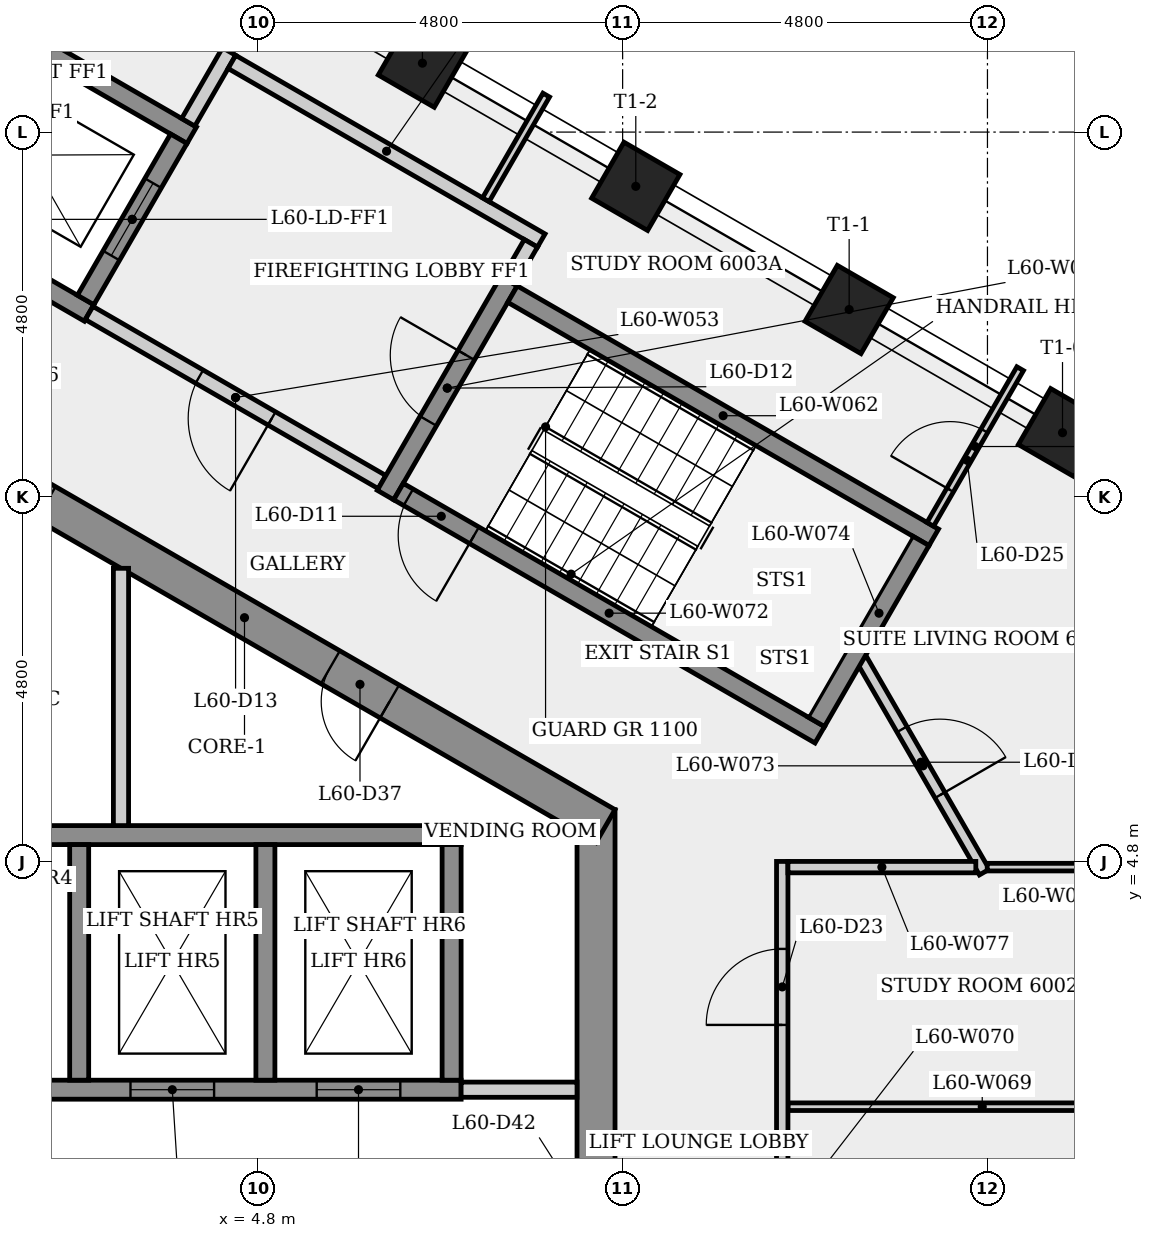
"""IFC4 building model, lengths in metres.
Left out: names, types, materials, properties, quantities, classifications, styles, units other than length and angle.
Written with IfcOpenShell. Run it as: python <this file> out.ifc"""

import sys

from ifc_helpers import new_model, si_unit, direction, frame, frame_2d, origin, origin_2d, place, context, subcontext, project, spatial, rectangle, extrude, element, fill, save


model = new_model("IFC4")
c1 = context("Model", 3, precision=1e-05, world=origin(), true_north=direction((0.0, 1.0)))
c2 = subcontext(c1, "Body", "Model", "MODEL_VIEW")
j1 = project(units=[si_unit("LENGTHUNIT", "METRE"), si_unit("PLANEANGLEUNIT", "RADIAN")], contexts=[c1])
p1 = place(None, origin())
s1 = spatial("IfcSite", under=j1, at=p1, CompositionType="ELEMENT")
p2 = place(p1, origin())
s2 = spatial("IfcBuilding", under=s1, at=p2, CompositionType="ELEMENT")
p3 = place(p2, frame((0.0, 0.0, 225.7)))
s3 = spatial("IfcBuildingStorey", under=s2, at=p3, CompositionType="ELEMENT", Elevation=225.7)
p4 = place(p3, frame((9.25, -5.485, 0.0), z_axis=(0.0, 0.0, 1.0), x_axis=(0.0, 1.0, 0.0)))
e1 = element("IfcWall", 1, at=p4, inside=s3, PredefinedType="SHEAR", context=c2, shape_type="SweptSolid", body=[
    extrude(rectangle(XDim=10.97, YDim=0.5, at=frame_2d((5.485, 0.0))), origin(), (0.0, 0.0, 1.0), 3.4),
])
p5 = place(p4, frame((4.685, 0.0, 0.0)))
e2 = element("IfcOpeningElement", 2, at=p5, cuts=e1, PredefinedType="OPENING", context=c2, shape_type="SweptSolid", body=[
    extrude(rectangle(XDim=1.6, YDim=2.1, at=frame_2d((0.8, 1.05))), frame((0.0, 0.26, 0.0), z_axis=(0.0, -1.0, 0.0), x_axis=(1.0, 0.0, 0.0)), (0.0, 0.0, 1.0), 0.52),
])
p6 = place(p3, frame((9.375, 5.268, 0.0), z_axis=(0.0, 0.0, 1.0), x_axis=(-0.866023993627, 0.500002442456, 0.0)))
e3 = element("IfcWall", 3, at=p6, inside=s3, PredefinedType="SHEAR", context=c2, shape_type="SweptSolid", body=[
    extrude(rectangle(XDim=10.97, YDim=0.5, at=frame_2d((5.485, 0.0))), origin(), (0.0, 0.0, 1.0), 3.4),
])
p7 = place(p6, frame((8.5, 0.0, 0.0)))
e4 = element("IfcOpeningElement", 4, at=p7, cuts=e3, PredefinedType="OPENING", context=c2, shape_type="SweptSolid", body=[
    extrude(rectangle(XDim=0.9, YDim=2.1, at=frame_2d((0.45, 1.05))), frame((0.0, 0.26, 0.0), z_axis=(0.0, -1.0, 0.0), x_axis=(1.0, 0.0, 0.0)), (0.0, 0.0, 1.0), 0.52),
])
p8 = place(p6, frame((3.28, 0.0, 0.0)))
e5 = element("IfcOpeningElement", 5, at=p8, cuts=e3, PredefinedType="OPENING", context=c2, shape_type="SweptSolid", body=[
    extrude(rectangle(XDim=0.9, YDim=2.1, at=frame_2d((0.45, 1.05))), frame((0.0, 0.26, 0.0), z_axis=(0.0, -1.0, 0.0), x_axis=(1.0, 0.0, 0.0)), (0.0, 0.0, 1.0), 0.52),
])
for number, where, z_axis, x_axis in (
    (6, (15.387, 10.445, 0.0), (0.0, 0.0, 1.0), (0.5, 0.866, 0.0)),
    (7, (12.58, 12.065, 0.0), (0.0, 0.0, 1.0), (0.5, 0.866, 0.0)),
    (8, (9.773, 13.686, 0.0), (0.0, 0.0, 1.0), (0.5, 0.866, 0.0)),
    (9, (6.966, 15.307, 0.0), (0.0, 0.0, 1.0), (0.5, 0.866, 0.0)),
):
    element("IfcColumn", number, at=place(p3, frame(where, z_axis=z_axis, x_axis=x_axis)), inside=s3, PredefinedType="COLUMN", context=c2, shape_type="SweptSolid", body=[
        extrude(rectangle(XDim=0.85, YDim=0.85, at=origin_2d()), origin(), (0.0, 0.0, 1.0), 3.4),
    ])
p9 = place(p3, frame((-7.475, 1.8, 0.0), z_axis=(0.0, 0.0, 1.0), x_axis=(1.0, 0.0, 0.0)))
e10 = element("IfcWall", 10, at=p9, inside=s3, PredefinedType="SHEAR", context=c2, shape_type="SweptSolid", body=[
    extrude(rectangle(XDim=14.95, YDim=0.25, at=frame_2d((7.475, 0.0))), origin(), (0.0, 0.0, 1.0), 3.05),
])
p10 = place(p9, frame((0.8, 0.0, 0.0)))
e11 = element("IfcOpeningElement", 11, at=p10, cuts=e10, PredefinedType="OPENING", context=c2, shape_type="SweptSolid", body=[
    extrude(rectangle(XDim=1.1, YDim=2.1, at=frame_2d((0.55, 1.05))), frame((0.0, 0.135, 0.0), z_axis=(0.0, -1.0, 0.0), x_axis=(1.0, 0.0, 0.0)), (0.0, 0.0, 1.0), 0.27),
])
p11 = place(p9, frame((3.25, 0.0, 0.0)))
e12 = element("IfcOpeningElement", 12, at=p11, cuts=e10, PredefinedType="OPENING", context=c2, shape_type="SweptSolid", body=[
    extrude(rectangle(XDim=1.1, YDim=2.1, at=frame_2d((0.55, 1.05))), frame((0.0, 0.135, 0.0), z_axis=(0.0, -1.0, 0.0), x_axis=(1.0, 0.0, 0.0)), (0.0, 0.0, 1.0), 0.27),
])
p12 = place(p9, frame((5.7, 0.0, 0.0)))
e13 = element("IfcOpeningElement", 13, at=p12, cuts=e10, PredefinedType="OPENING", context=c2, shape_type="SweptSolid", body=[
    extrude(rectangle(XDim=1.1, YDim=2.1, at=frame_2d((0.55, 1.05))), frame((0.0, 0.135, 0.0), z_axis=(0.0, -1.0, 0.0), x_axis=(1.0, 0.0, 0.0)), (0.0, 0.0, 1.0), 0.27),
])
p13 = place(p9, frame((8.15, 0.0, 0.0)))
e14 = element("IfcOpeningElement", 14, at=p13, cuts=e10, PredefinedType="OPENING", context=c2, shape_type="SweptSolid", body=[
    extrude(rectangle(XDim=1.1, YDim=2.1, at=frame_2d((0.55, 1.05))), frame((0.0, 0.135, 0.0), z_axis=(0.0, -1.0, 0.0), x_axis=(1.0, 0.0, 0.0)), (0.0, 0.0, 1.0), 0.27),
])
p14 = place(p9, frame((10.6, 0.0, 0.0)))
e15 = element("IfcOpeningElement", 15, at=p14, cuts=e10, PredefinedType="OPENING", context=c2, shape_type="SweptSolid", body=[
    extrude(rectangle(XDim=1.1, YDim=2.1, at=frame_2d((0.55, 1.05))), frame((0.0, 0.135, 0.0), z_axis=(0.0, -1.0, 0.0), x_axis=(1.0, 0.0, 0.0)), (0.0, 0.0, 1.0), 0.27),
])
p15 = place(p9, frame((13.05, 0.0, 0.0)))
e16 = element("IfcOpeningElement", 16, at=p15, cuts=e10, PredefinedType="OPENING", context=c2, shape_type="SweptSolid", body=[
    extrude(rectangle(XDim=1.1, YDim=2.1, at=frame_2d((0.55, 1.05))), frame((0.0, 0.135, 0.0), z_axis=(0.0, -1.0, 0.0), x_axis=(1.0, 0.0, 0.0)), (0.0, 0.0, 1.0), 0.27),
])
p16 = place(p3, frame((-7.225, 5.15, 0.0), z_axis=(0.0, 0.0, 1.0), x_axis=(1.0, 0.0, 0.0)))
e17 = element("IfcWall", 17, at=p16, inside=s3, PredefinedType="SHEAR", context=c2, shape_type="SweptSolid", body=[
    extrude(rectangle(XDim=14.7, YDim=0.25, at=frame_2d((7.35, 0.0))), origin(), (0.0, 0.0, 1.0), 3.05),
])
p17 = place(p3, frame((1.073, 16.008, 0.0), z_axis=(0.0, 0.0, 1.0), x_axis=(0.866040211805, -0.499974350878, 0.0)))
e18 = element("IfcWall", 18, at=p17, inside=s3, PredefinedType="SHEAR", context=c2, shape_type="SweptSolid", body=[
    extrude(rectangle(XDim=3.3, YDim=0.25, at=frame_2d((1.65, 0.0))), origin(), (0.0, 0.0, 1.0), 3.05),
])
p18 = place(p3, frame((2.45, 5.025, 0.0), z_axis=(0.0, 0.0, 1.0), x_axis=(0.0, -1.0, 0.0)))
e19 = element("IfcWall", 19, at=p18, inside=s3, PredefinedType="SHEAR", context=c2, shape_type="SweptSolid", body=[
    extrude(rectangle(XDim=3.1, YDim=0.25, at=frame_2d((1.55, 0.0))), origin(), (0.0, 0.0, 1.0), 3.4),
])
p19 = place(p3, frame((2.581, 12.02, 0.0), z_axis=(0.0, 0.0, 1.0), x_axis=(-0.866040211805, 0.499974350878, 0.0)))
e20 = element("IfcWall", 20, at=p19, inside=s3, PredefinedType="SHEAR", context=c2, shape_type="SweptSolid", body=[
    extrude(rectangle(XDim=3.3, YDim=0.25, at=frame_2d((1.65, 0.0))), origin(), (0.0, 0.0, 1.0), 3.05),
])
p20 = place(p3, frame((2.535, 12.191, 0.0), z_axis=(0.0, 0.0, 1.0), x_axis=(0.500061746146, 0.865989751695, 0.0)))
e21 = element("IfcWall", 21, at=p20, inside=s3, PredefinedType="SHEAR", context=c2, shape_type="SweptSolid", body=[
    extrude(rectangle(XDim=2.45, YDim=0.25, at=frame_2d((1.225, 0.0))), origin(), (0.0, 0.0, 1.0), 3.4),
])
p21 = place(p20, frame((0.675, 0.0, 0.0)))
e22 = element("IfcOpeningElement", 22, at=p21, cuts=e21, PredefinedType="OPENING", context=c2, shape_type="SweptSolid", body=[
    extrude(rectangle(XDim=1.1, YDim=2.1, at=frame_2d((0.55, 1.05))), frame((0.0, 0.135, 0.0), z_axis=(0.0, -1.0, 0.0), x_axis=(1.0, 0.0, 0.0)), (0.0, 0.0, 1.0), 0.27),
])
p22 = place(p3, frame((3.0, 8.66, 0.0), z_axis=(0.0, 0.0, 1.0), x_axis=(0.0, -1.0, 0.0)))
e23 = element("IfcWall", 23, at=p22, inside=s3, PredefinedType="PARTITIONING", context=c2, shape_type="SweptSolid", body=[
    extrude(rectangle(XDim=3.385, YDim=0.2, at=frame_2d((1.693, 0.0))), origin(), (0.0, 0.0, 1.0), 3.05),
])
p23 = place(p3, frame((3.885, 14.529, 0.0), z_axis=(0.0, 0.0, 1.0), x_axis=(0.499997628298, 0.866026773083, 0.0)))
e24 = element("IfcWall", 24, at=p23, inside=s3, PredefinedType="PARTITIONING", context=c2, shape_type="SweptSolid", body=[
    extrude(rectangle(XDim=1.075, YDim=0.2, at=frame_2d((0.538, 0.0))), origin(), (0.0, 0.0, 1.0), 3.05),
])
p24 = place(p3, frame((4.459, 15.323, 0.0), z_axis=(0.0, 0.0, 1.0), x_axis=(0.866016039709, -0.500016218704, 0.0)))
e25 = element("IfcWall", 25, at=p24, inside=s3, PredefinedType="PARTITIONING", context=c2, shape_type="SweptSolid", body=[
    extrude(rectangle(XDim=4.7, YDim=0.2, at=frame_2d((2.35, 0.0))), origin(), (0.0, 0.0, 1.0), 3.05),
])
p25 = place(p3, frame((4.9, 5.025, 0.0), z_axis=(0.0, 0.0, 1.0), x_axis=(0.0, -1.0, 0.0)))
e26 = element("IfcWall", 26, at=p25, inside=s3, PredefinedType="SHEAR", context=c2, shape_type="SweptSolid", body=[
    extrude(rectangle(XDim=3.1, YDim=0.25, at=frame_2d((1.55, 0.0))), origin(), (0.0, 0.0, 1.0), 3.4),
])
p26 = place(p3, frame((6.435, 9.795, 0.0), z_axis=(0.0, 0.0, 1.0), x_axis=(-0.866012907634, 0.500021643343, 0.0)))
e27 = element("IfcWall", 27, at=p26, inside=s3, PredefinedType="PARTITIONING", context=c2, shape_type="SweptSolid", body=[
    extrude(rectangle(XDim=4.45, YDim=0.2, at=frame_2d((2.225, 0.0))), origin(), (0.0, 0.0, 1.0), 3.05),
])
p27 = place(p26, frame((1.675, 0.0, 0.0)))
e28 = element("IfcOpeningElement", 28, at=p27, cuts=e27, PredefinedType="OPENING", context=c2, shape_type="SweptSolid", body=[
    extrude(rectangle(XDim=1.1, YDim=2.1, at=frame_2d((0.55, 1.05))), frame((0.0, 0.11, 0.0), z_axis=(0.0, -1.0, 0.0), x_axis=(1.0, 0.0, 0.0)), (0.0, 0.0, 1.0), 0.22),
])
p28 = place(p3, frame((6.48, 9.624, 0.0), z_axis=(0.0, 0.0, 1.0), x_axis=(0.500017246033, 0.866015446554, 0.0)))
e29 = element("IfcWall", 29, at=p28, inside=s3, PredefinedType="SHEAR", context=c2, shape_type="SweptSolid", body=[
    extrude(rectangle(XDim=3.25, YDim=0.25, at=frame_2d((1.625, 0.0))), origin(), (0.0, 0.0, 1.0), 3.05),
])
p29 = place(p28, frame((1.125, 0.0, 0.0)))
e30 = element("IfcOpeningElement", 30, at=p29, cuts=e29, PredefinedType="OPENING", context=c2, shape_type="SweptSolid", body=[
    extrude(rectangle(XDim=1.0, YDim=2.1, at=frame_2d((0.5, 1.05))), frame((0.0, 0.135, 0.0), z_axis=(0.0, -1.0, 0.0), x_axis=(1.0, 0.0, 0.0)), (0.0, 0.0, 1.0), 0.27),
])
p30 = place(p3, frame((7.475, 1.8, 0.0), z_axis=(0.0, 0.0, 1.0), x_axis=(1.0, 0.0, 0.0)))
e31 = element("IfcWall", 31, at=p30, inside=s3, PredefinedType="PARTITIONING", context=c2, shape_type="SweptSolid", body=[
    extrude(rectangle(XDim=1.525, YDim=0.2, at=frame_2d((0.763, 0.0))), origin(), (0.0, 0.0, 1.0), 3.05),
])
p31 = place(p3, frame((7.35, 5.025, 0.0), z_axis=(0.0, 0.0, 1.0), x_axis=(0.0, -1.0, 0.0)))
e32 = element("IfcWall", 32, at=p31, inside=s3, PredefinedType="SHEAR", context=c2, shape_type="SweptSolid", body=[
    extrude(rectangle(XDim=3.1, YDim=0.25, at=frame_2d((1.55, 0.0))), origin(), (0.0, 0.0, 1.0), 3.4),
])
p32 = place(p3, frame((7.8, 13.51, 0.0), z_axis=(0.0, 0.0, 1.0), x_axis=(0.500037068326, 0.866004001318, 0.0)))
e33 = element("IfcWall", 33, at=p32, inside=s3, PredefinedType="PARTITIONING", context=c2, shape_type="SweptSolid", body=[
    extrude(rectangle(XDim=1.59, YDim=0.1, at=frame_2d((0.795, 0.0))), origin(), (0.0, 0.0, 1.0), 3.05),
])
p33 = place(p3, frame((8.151, 12.268, 0.0), z_axis=(0.0, 0.0, 1.0), x_axis=(0.866025499775, -0.499999833739, 0.0)))
e34 = element("IfcWall", 34, at=p33, inside=s3, PredefinedType="SHEAR", context=c2, shape_type="SweptSolid", body=[
    extrude(rectangle(XDim=6.4, YDim=0.25, at=frame_2d((3.2, 0.0))), origin(), (0.0, 0.0, 1.0), 3.05),
])
p34 = place(p3, frame((8.393, 12.937, 0.0), z_axis=(0.0, 0.0, 1.0), x_axis=(-0.500065409566, -0.86598763626, 0.0)))
e35 = element("IfcWall", 35, at=p34, inside=s3, PredefinedType="PARTITIONING", context=c2, shape_type="SweptSolid", body=[
    extrude(rectangle(XDim=0.575, YDim=0.2, at=frame_2d((0.288, 0.0))), origin(), (0.0, 0.0, 1.0), 3.05),
])
p35 = place(p3, frame((11.775, 1.576, 0.0), z_axis=(0.0, 0.0, 1.0), x_axis=(1.0, 0.0, 0.0)))
e36 = element("IfcWall", 36, at=p35, inside=s3, PredefinedType="PARTITIONING", context=c2, shape_type="SweptSolid", body=[
    extrude(rectangle(XDim=5.113, YDim=0.1, at=frame_2d((2.556, 0.0))), origin(), (0.0, 0.0, 1.0), 3.05),
])
p36 = place(p3, frame((11.7, -4.654, 0.0), z_axis=(0.0, 0.0, 1.0), x_axis=(0.0, 1.0, 0.0)))
e37 = element("IfcWall", 37, at=p36, inside=s3, PredefinedType="PARTITIONING", context=c2, shape_type="SweptSolid", body=[
    extrude(rectangle(XDim=9.457, YDim=0.15, at=frame_2d((4.729, 0.0))), origin(), (0.0, 0.0, 1.0), 3.05),
])
p37 = place(p36, frame((2.6, 0.0, 0.0)))
e38 = element("IfcOpeningElement", 38, at=p37, cuts=e37, PredefinedType="OPENING", context=c2, shape_type="SweptSolid", body=[
    extrude(rectangle(XDim=1.0, YDim=2.1, at=frame_2d((0.5, 1.05))), frame((0.0, 0.085, 0.0), z_axis=(0.0, -1.0, 0.0), x_axis=(1.0, 0.0, 0.0)), (0.0, 0.0, 1.0), 0.17),
])
p38 = place(p36, frame((7.306, 0.0, 0.0)))
e39 = element("IfcOpeningElement", 39, at=p38, cuts=e37, PredefinedType="OPENING", context=c2, shape_type="SweptSolid", body=[
    extrude(rectangle(XDim=1.0, YDim=2.1, at=frame_2d((0.5, 1.05))), frame((0.0, 0.085, 0.0), z_axis=(0.0, -1.0, 0.0), x_axis=(1.0, 0.0, 0.0)), (0.0, 0.0, 1.0), 0.17),
])
p39 = place(p3, frame((12.194, 6.47, 0.0), z_axis=(0.0, 0.0, 1.0), x_axis=(-0.866025499775, 0.499999833739, 0.0)))
e40 = element("IfcWall", 40, at=p39, inside=s3, PredefinedType="SHEAR", context=c2, shape_type="SweptSolid", body=[
    extrude(rectangle(XDim=6.4, YDim=0.25, at=frame_2d((3.2, 0.0))), origin(), (0.0, 0.0, 1.0), 3.05),
])
p40 = place(p39, frame((5.25, 0.0, 0.0)))
e41 = element("IfcOpeningElement", 41, at=p40, cuts=e40, PredefinedType="OPENING", context=c2, shape_type="SweptSolid", body=[
    extrude(rectangle(XDim=1.0, YDim=2.1, at=frame_2d((0.5, 1.05))), frame((0.0, 0.135, 0.0), z_axis=(0.0, -1.0, 0.0), x_axis=(1.0, 0.0, 0.0)), (0.0, 0.0, 1.0), 0.27),
])
p41 = place(p3, frame((12.745, 7.459, 0.0), z_axis=(0.0, 0.0, 1.0), x_axis=(0.500019253631, -0.86601428741, 0.0)))
e42 = element("IfcWall", 42, at=p41, inside=s3, PredefinedType="PARTITIONING", context=c2, shape_type="SweptSolid", body=[
    extrude(rectangle(XDim=3.228, YDim=0.15, at=frame_2d((1.614, 0.0))), origin(), (0.0, 0.0, 1.0), 3.05),
])
p42 = place(p41, frame((1.059, 0.0, 0.0)))
e43 = element("IfcOpeningElement", 43, at=p42, cuts=e42, PredefinedType="OPENING", context=c2, shape_type="SweptSolid", body=[
    extrude(rectangle(XDim=1.0, YDim=2.1, at=frame_2d((0.5, 1.05))), frame((0.0, 0.085, 0.0), z_axis=(0.0, -1.0, 0.0), x_axis=(1.0, 0.0, 0.0)), (0.0, 0.0, 1.0), 0.17),
])
p43 = place(p3, frame((12.148, 6.641, 0.0), z_axis=(0.0, 0.0, 1.0), x_axis=(0.500034990121, 0.866005201286, 0.0)))
e44 = element("IfcWall", 44, at=p43, inside=s3, PredefinedType="SHEAR", context=c2, shape_type="SweptSolid", body=[
    extrude(rectangle(XDim=2.75, YDim=0.25, at=frame_2d((1.375, 0.0))), origin(), (0.0, 0.0, 1.0), 3.05),
])
p44 = place(p3, frame((13.648, 9.239, 0.0), z_axis=(0.0, 0.0, 1.0), x_axis=(0.50004711805, 0.865998198456, 0.0)))
e45 = element("IfcWall", 45, at=p44, inside=s3, PredefinedType="PARTITIONING", context=c2, shape_type="SweptSolid", body=[
    extrude(rectangle(XDim=2.365, YDim=0.1, at=frame_2d((1.183, 0.0))), origin(), (0.0, 0.0, 1.0), 3.05),
])
p45 = place(p44, frame((0.522, 0.0, 0.0)))
e46 = element("IfcOpeningElement", 46, at=p45, cuts=e45, PredefinedType="OPENING", context=c2, shape_type="SweptSolid", body=[
    extrude(rectangle(XDim=0.9, YDim=2.1, at=frame_2d((0.45, 1.05))), frame((0.0, 0.06, 0.0), z_axis=(0.0, -1.0, 0.0), x_axis=(1.0, 0.0, 0.0)), (0.0, 0.0, 1.0), 0.12),
])
p46 = place(p3, frame((14.247, 4.729, 0.0), z_axis=(0.0, 0.0, 1.0), x_axis=(-1.0, 0.0, 0.0)))
e47 = element("IfcWall", 47, at=p46, inside=s3, PredefinedType="PARTITIONING", context=c2, shape_type="SweptSolid", body=[
    extrude(rectangle(XDim=2.472, YDim=0.15, at=frame_2d((1.236, 0.0))), origin(), (0.0, 0.0, 1.0), 3.05),
])
p47 = place(p3, frame((14.397, 4.729, 0.0), z_axis=(0.0, 0.0, 1.0), x_axis=(1.0, 0.0, 0.0)))
e48 = element("IfcWall", 48, at=p47, inside=s3, PredefinedType="PARTITIONING", context=c2, shape_type="SweptSolid", body=[
    extrude(rectangle(XDim=2.49, YDim=0.1, at=frame_2d((1.245, 0.0))), origin(), (0.0, 0.0, 1.0), 3.05),
])
p48 = place(p14, origin())
e49 = element("IfcDoor", 49, at=p48, inside=s3, OperationType="SLIDING_TO_LEFT", PredefinedType="DOOR", context=c2, shape_type="SweptSolid", body=[
    extrude(rectangle(XDim=1.1, YDim=2.1, at=frame_2d((0.55, 1.05))), frame((0.0, 0.025, 0.0), z_axis=(0.0, -1.0, 0.0), x_axis=(1.0, 0.0, 0.0)), (0.0, 0.0, 1.0), 0.05),
])
fill(e15, e49)
p49 = place(p15, origin())
e50 = element("IfcDoor", 50, at=p49, inside=s3, OperationType="SLIDING_TO_LEFT", PredefinedType="DOOR", context=c2, shape_type="SweptSolid", body=[
    extrude(rectangle(XDim=1.1, YDim=2.1, at=frame_2d((0.55, 1.05))), frame((0.0, 0.025, 0.0), z_axis=(0.0, -1.0, 0.0), x_axis=(1.0, 0.0, 0.0)), (0.0, 0.0, 1.0), 0.05),
])
fill(e16, e50)
p50 = place(p40, origin())
e51 = element("IfcDoor", 51, at=p50, inside=s3, OperationType="SINGLE_SWING_LEFT", PredefinedType="DOOR", context=c2, shape_type="SweptSolid", body=[
    extrude(rectangle(XDim=1.0, YDim=2.1, at=frame_2d((0.5, 1.05))), frame((0.0, 0.025, 0.0), z_axis=(0.0, -1.0, 0.0), x_axis=(1.0, 0.0, 0.0)), (0.0, 0.0, 1.0), 0.05),
])
fill(e41, e51)
p51 = place(p29, origin())
e52 = element("IfcDoor", 52, at=p51, inside=s3, OperationType="SINGLE_SWING_RIGHT", PredefinedType="DOOR", context=c2, shape_type="SweptSolid", body=[
    extrude(rectangle(XDim=1.0, YDim=2.1, at=frame_2d((0.5, 1.05))), frame((0.0, 0.025, 0.0), z_axis=(0.0, -1.0, 0.0), x_axis=(1.0, 0.0, 0.0)), (0.0, 0.0, 1.0), 0.05),
])
fill(e30, e52)
p52 = place(p27, origin())
e53 = element("IfcDoor", 53, at=p52, inside=s3, OperationType="SINGLE_SWING_LEFT", PredefinedType="DOOR", context=c2, shape_type="SweptSolid", body=[
    extrude(rectangle(XDim=1.1, YDim=2.1, at=frame_2d((0.55, 1.05))), frame((0.0, 0.025, 0.0), z_axis=(0.0, -1.0, 0.0), x_axis=(1.0, 0.0, 0.0)), (0.0, 0.0, 1.0), 0.05),
])
fill(e28, e53)
p53 = place(p21, origin())
e54 = element("IfcDoor", 54, at=p53, inside=s3, OperationType="SLIDING_TO_LEFT", PredefinedType="DOOR", context=c2, shape_type="SweptSolid", body=[
    extrude(rectangle(XDim=1.1, YDim=2.1, at=frame_2d((0.55, 1.05))), frame((0.0, 0.025, 0.0), z_axis=(0.0, -1.0, 0.0), x_axis=(1.0, 0.0, 0.0)), (0.0, 0.0, 1.0), 0.05),
])
fill(e22, e54)
p54 = place(p38, origin())
e55 = element("IfcDoor", 55, at=p54, inside=s3, OperationType="SINGLE_SWING_LEFT", PredefinedType="DOOR", context=c2, shape_type="SweptSolid", body=[
    extrude(rectangle(XDim=1.0, YDim=2.1, at=frame_2d((0.5, 1.05))), frame((0.0, 0.025, 0.0), z_axis=(0.0, -1.0, 0.0), x_axis=(1.0, 0.0, 0.0)), (0.0, 0.0, 1.0), 0.05),
])
fill(e39, e55)
p55 = place(p42, origin())
e56 = element("IfcDoor", 56, at=p55, inside=s3, OperationType="SINGLE_SWING_RIGHT", PredefinedType="DOOR", context=c2, shape_type="SweptSolid", body=[
    extrude(rectangle(XDim=1.0, YDim=2.1, at=frame_2d((0.5, 1.05))), frame((0.0, 0.025, 0.0), z_axis=(0.0, -1.0, 0.0), x_axis=(1.0, 0.0, 0.0)), (0.0, 0.0, 1.0), 0.05),
])
fill(e43, e56)
p56 = place(p45, origin())
e57 = element("IfcDoor", 57, at=p56, inside=s3, OperationType="SINGLE_SWING_LEFT", PredefinedType="DOOR", context=c2, shape_type="SweptSolid", body=[
    extrude(rectangle(XDim=0.9, YDim=2.1, at=frame_2d((0.45, 1.05))), frame((0.0, 0.025, 0.0), z_axis=(0.0, -1.0, 0.0), x_axis=(1.0, 0.0, 0.0)), (0.0, 0.0, 1.0), 0.05),
])
fill(e46, e57)
p57 = place(p8, origin())
e58 = element("IfcDoor", 58, at=p57, inside=s3, OperationType="SINGLE_SWING_LEFT", PredefinedType="DOOR", context=c2, shape_type="SweptSolid", body=[
    extrude(rectangle(XDim=0.9, YDim=2.1, at=frame_2d((0.45, 1.05))), frame((0.0, 0.025, 0.0), z_axis=(0.0, -1.0, 0.0), x_axis=(1.0, 0.0, 0.0)), (0.0, 0.0, 1.0), 0.05),
])
fill(e5, e58)
save(model, sys.argv[1])
